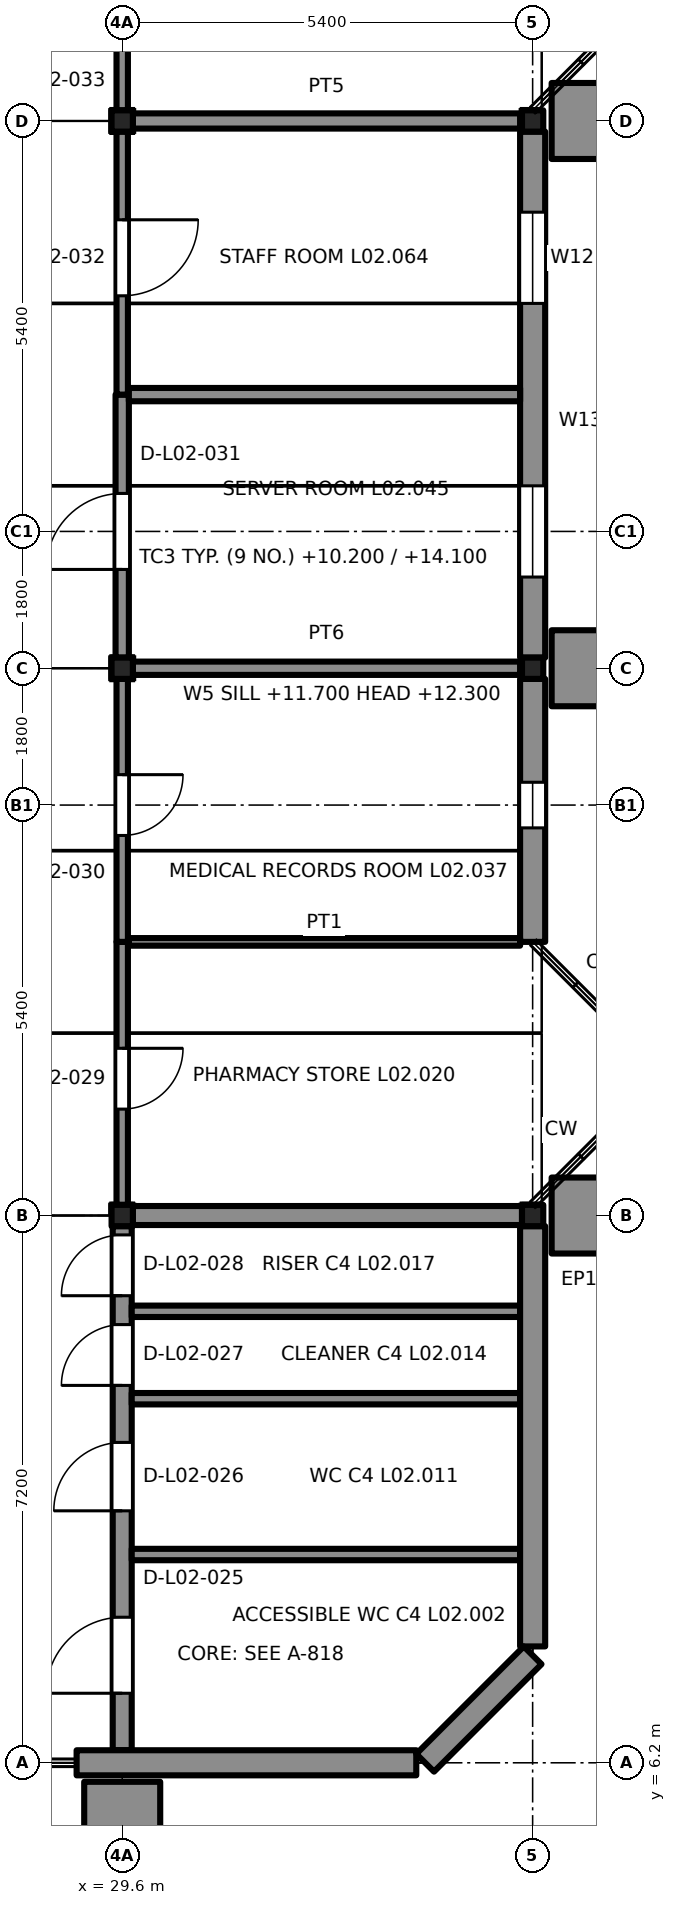
"""IFC4 building model, lengths in metres.
Left out: names, types, materials, properties, quantities, classifications, styles, units other than length and angle.
Written with IfcOpenShell. Run it as: python <this file> out.ifc"""

import sys

from ifc_helpers import new_model, si_unit, direction, frame, frame_2d, origin, origin_2d, place, context, subcontext, project, spatial, rectangle, extrude, element, fill, save


model = new_model("IFC4")
c1 = context("Model", 3, precision=1e-05, world=origin(), true_north=direction((0.0, 1.0)))
c2 = subcontext(c1, "Body", "Model", "MODEL_VIEW")
j1 = project(units=[si_unit("LENGTHUNIT", "METRE"), si_unit("PLANEANGLEUNIT", "RADIAN")], contexts=[c1])
p1 = place(None, origin())
s1 = spatial("IfcSite", under=j1, at=p1, CompositionType="ELEMENT")
p2 = place(p1, origin())
s2 = spatial("IfcBuilding", under=s1, at=p2, CompositionType="ELEMENT")
p3 = place(p2, frame((0.0, 0.0, 10.2)))
s3 = spatial("IfcBuildingStorey", under=s2, at=p3, CompositionType="ELEMENT", Elevation=10.2)
for number, where, z_axis, x_axis in (
    (1, (29.6, 13.4, 0.0), (0.0, 0.0, 1.0), (1.0, 0.0, 0.0)),
    (2, (35.0, 13.4, 0.0), (0.0, 0.0, 1.0), (1.0, 0.0, 0.0)),
    (3, (29.6, 20.6, 0.0), (0.0, 0.0, 1.0), (1.0, 0.0, 0.0)),
    (4, (35.0, 20.6, 0.0), (0.0, 0.0, 1.0), (1.0, 0.0, 0.0)),
    (5, (29.6, 27.8, 0.0), (0.0, 0.0, 1.0), (1.0, 0.0, 0.0)),
    (6, (35.0, 27.8, 0.0), (0.0, 0.0, 1.0), (1.0, 0.0, 0.0)),
):
    element("IfcColumn", number, at=place(p3, frame(where, z_axis=z_axis, x_axis=x_axis)), inside=s3, PredefinedType="COLUMN", context=c2, shape_type="SweptSolid", body=[
        extrude(rectangle(XDim=0.28, YDim=0.28, at=origin_2d()), origin(), (0.0, 0.0, 1.0), 3.9),
    ])
p4 = place(p3, frame((29.6, 6.365, 0.0), z_axis=(0.0, 0.0, 1.0), x_axis=(0.0, 1.0, 0.0)))
e7 = element("IfcWall", 7, at=p4, inside=s3, PredefinedType="SHEAR", context=c2, shape_type="SweptSolid", body=[
    extrude(rectangle(XDim=6.895, YDim=0.25, at=frame_2d((3.448, 0.0))), origin(), (0.0, 0.0, 1.0), 3.65),
])
p5 = place(p4, frame((0.75, 0.0, 0.0)))
e8 = element("IfcOpeningElement", 8, at=p5, cuts=e7, PredefinedType="OPENING", context=c2, shape_type="SweptSolid", body=[
    extrude(rectangle(XDim=1.0, YDim=2.1, at=frame_2d((0.5, 1.05))), frame((0.0, 0.135, 0.0), z_axis=(0.0, -1.0, 0.0), x_axis=(1.0, 0.0, 0.0)), (0.0, 0.0, 1.0), 0.27),
])
p6 = place(p4, frame((3.15, 0.0, 0.0)))
e9 = element("IfcOpeningElement", 9, at=p6, cuts=e7, PredefinedType="OPENING", context=c2, shape_type="SweptSolid", body=[
    extrude(rectangle(XDim=0.9, YDim=2.1, at=frame_2d((0.45, 1.05))), frame((0.0, 0.135, 0.0), z_axis=(0.0, -1.0, 0.0), x_axis=(1.0, 0.0, 0.0)), (0.0, 0.0, 1.0), 0.27),
])
p7 = place(p4, frame((4.8, 0.0, 0.0)))
e10 = element("IfcOpeningElement", 10, at=p7, cuts=e7, PredefinedType="OPENING", context=c2, shape_type="SweptSolid", body=[
    extrude(rectangle(XDim=0.8, YDim=2.1, at=frame_2d((0.4, 1.05))), frame((0.0, 0.135, 0.0), z_axis=(0.0, -1.0, 0.0), x_axis=(1.0, 0.0, 0.0)), (0.0, 0.0, 1.0), 0.27),
])
p8 = place(p4, frame((5.98, 0.0, 0.0)))
e11 = element("IfcOpeningElement", 11, at=p8, cuts=e7, PredefinedType="OPENING", context=c2, shape_type="SweptSolid", body=[
    extrude(rectangle(XDim=0.8, YDim=2.1, at=frame_2d((0.4, 1.05))), frame((0.0, 0.135, 0.0), z_axis=(0.0, -1.0, 0.0), x_axis=(1.0, 0.0, 0.0)), (0.0, 0.0, 1.0), 0.27),
])
p9 = place(p3, frame((29.74, 13.4, 0.0), z_axis=(0.0, 0.0, 1.0), x_axis=(1.0, 0.0, 0.0)))
e12 = element("IfcWall", 12, at=p9, inside=s3, PredefinedType="SHEAR", context=c2, shape_type="SweptSolid", body=[
    extrude(rectangle(XDim=5.12, YDim=0.25, at=frame_2d((2.56, 0.0))), origin(), (0.0, 0.0, 1.0), 3.65),
])
for number, where, z_axis, x_axis in (
    (13, (29.725, 8.94, 0.0), (0.0, 0.0, 1.0), (1.0, 0.0, 0.0)),
    (14, (29.725, 10.99, 0.0), (0.0, 0.0, 1.0), (1.0, 0.0, 0.0)),
    (15, (29.725, 12.14, 0.0), (0.0, 0.0, 1.0), (1.0, 0.0, 0.0)),
):
    element("IfcWall", number, at=place(p3, frame(where, z_axis=z_axis, x_axis=x_axis)), inside=s3, PredefinedType="PARTITIONING", context=c2, shape_type="SweptSolid", body=[
        extrude(rectangle(XDim=5.11, YDim=0.15, at=frame_2d((2.555, 0.0))), origin(), (0.0, 0.0, 1.0), 3.65),
    ])
p10 = place(p3, frame((35.0, 13.26, 0.0), z_axis=(0.0, 0.0, 1.0), x_axis=(0.0, -1.0, 0.0)))
e16 = element("IfcWall", 16, at=p10, inside=s3, PredefinedType="SOLIDWALL", context=c2, shape_type="SweptSolid", body=[
    extrude(rectangle(XDim=5.529, YDim=0.33, at=frame_2d((2.765, 0.0))), origin(), (0.0, 0.0, 1.0), 3.22),
])
p11 = place(p3, frame((35.0, 20.46, 0.0), z_axis=(0.0, 0.0, 1.0), x_axis=(0.0, -1.0, 0.0)))
e17 = element("IfcWall", 17, at=p11, inside=s3, PredefinedType="SOLIDWALL", context=c2, shape_type="SweptSolid", body=[
    extrude(rectangle(XDim=3.46, YDim=0.33, at=frame_2d((1.73, 0.0))), origin(), (0.0, 0.0, 1.0), 3.22),
])
p12 = place(p11, frame((1.36, 0.0, 1.5)))
e18 = element("IfcOpeningElement", 18, at=p12, cuts=e17, PredefinedType="OPENING", context=c2, shape_type="SweptSolid", body=[
    extrude(rectangle(XDim=0.6, YDim=0.6, at=frame_2d((0.3, 0.3))), frame((0.0, 0.175, 0.0), z_axis=(0.0, -1.0, 0.0), x_axis=(1.0, 0.0, 0.0)), (0.0, 0.0, 1.0), 0.35),
])
p13 = place(p3, frame((35.0, 27.66, 0.0), z_axis=(0.0, 0.0, 1.0), x_axis=(0.0, -1.0, 0.0)))
e19 = element("IfcWall", 19, at=p13, inside=s3, PredefinedType="SOLIDWALL", context=c2, shape_type="SweptSolid", body=[
    extrude(rectangle(XDim=6.92, YDim=0.33, at=frame_2d((3.46, 0.0))), origin(), (0.0, 0.0, 1.0), 3.22),
])
p14 = place(p13, frame((4.66, 0.0, 1.2)))
e20 = element("IfcOpeningElement", 20, at=p14, cuts=e19, PredefinedType="OPENING", context=c2, shape_type="SweptSolid", body=[
    extrude(rectangle(XDim=1.2, YDim=1.2, at=frame_2d((0.6, 0.6))), frame((0.0, 0.175, 0.0), z_axis=(0.0, -1.0, 0.0), x_axis=(1.0, 0.0, 0.0)), (0.0, 0.0, 1.0), 0.35),
])
p15 = place(p13, frame((1.06, 0.0, 0.9)))
e21 = element("IfcOpeningElement", 21, at=p15, cuts=e19, PredefinedType="OPENING", context=c2, shape_type="SweptSolid", body=[
    extrude(rectangle(XDim=1.2, YDim=1.5, at=frame_2d((0.6, 0.75))), frame((0.0, 0.175, 0.0), z_axis=(0.0, -1.0, 0.0), x_axis=(1.0, 0.0, 0.0)), (0.0, 0.0, 1.0), 0.35),
])
for number, where, z_axis, x_axis in (
    (22, (35.625, 13.9, 0.0), (0.0, 0.0, 1.0), (0.0, -1.0, 0.0)),
    (23, (35.625, 21.1, 0.0), (0.0, 0.0, 1.0), (0.0, -1.0, 0.0)),
    (24, (35.625, 28.3, 0.0), (0.0, 0.0, 1.0), (0.0, -1.0, 0.0)),
):
    element("IfcWall", number, at=place(p3, frame(where, z_axis=z_axis, x_axis=x_axis)), inside=s3, PredefinedType="SOLIDWALL", context=c2, shape_type="SweptSolid", body=[
        extrude(rectangle(XDim=1.0, YDim=0.75, at=frame_2d((0.5, 0.0))), origin(), (0.0, 0.0, 1.0), 3.9),
    ])
p16 = place(p3, frame((33.469, 6.2, 0.0), z_axis=(0.0, 0.0, 1.0), x_axis=(-1.0, 0.0, 0.0)))
e25 = element("IfcWall", 25, at=p16, inside=s3, PredefinedType="SOLIDWALL", context=c2, shape_type="SweptSolid", body=[
    extrude(rectangle(XDim=4.469, YDim=0.33, at=frame_2d((2.234, 0.0))), origin(), (0.0, 0.0, 1.0), 3.2),
])
p17 = place(p3, frame((30.1, 5.575, 0.0), z_axis=(0.0, 0.0, 1.0), x_axis=(-1.0, 0.0, 0.0)))
e26 = element("IfcWall", 26, at=p17, inside=s3, PredefinedType="SOLIDWALL", context=c2, shape_type="SweptSolid", body=[
    extrude(rectangle(XDim=1.0, YDim=0.75, at=frame_2d((0.5, 0.0))), origin(), (0.0, 0.0, 1.0), 3.9),
])
p18 = place(p3, frame((35.0, 7.614, 0.0), z_axis=(0.0, 0.0, 1.0), x_axis=(-0.707106781187, -0.707106781187, 0.0)))
e27 = element("IfcWall", 27, at=p18, inside=s3, PredefinedType="SOLIDWALL", context=c2, shape_type="SweptSolid", body=[
    extrude(rectangle(XDim=2.0, YDim=0.33, at=frame_2d((1.0, 0.0))), origin(), (0.0, 0.0, 1.0), 3.2),
])
p19 = place(p3, frame((29.6, 17.0, 0.0), z_axis=(0.0, 0.0, 1.0), x_axis=(0.0, -1.0, 0.0)))
e28 = element("IfcWall", 28, at=p19, inside=s3, PredefinedType="PARTITIONING", context=c2, shape_type="SweptSolid", body=[
    extrude(rectangle(XDim=3.46, YDim=0.15, at=frame_2d((1.73, 0.0))), origin(), (0.0, 0.0, 1.0), 3.22),
])
p20 = place(p19, frame((1.4, 0.0, 0.0)))
e29 = element("IfcOpeningElement", 29, at=p20, cuts=e28, PredefinedType="OPENING", context=c2, shape_type="SweptSolid", body=[
    extrude(rectangle(XDim=0.8, YDim=2.1, at=frame_2d((0.4, 1.05))), frame((0.0, 0.085, 0.0), z_axis=(0.0, -1.0, 0.0), x_axis=(1.0, 0.0, 0.0)), (0.0, 0.0, 1.0), 0.17),
])
p21 = place(p3, frame((29.6, 20.46, 0.0), z_axis=(0.0, 0.0, 1.0), x_axis=(0.0, -1.0, 0.0)))
e30 = element("IfcWall", 30, at=p21, inside=s3, PredefinedType="PARTITIONING", context=c2, shape_type="SweptSolid", body=[
    extrude(rectangle(XDim=3.46, YDim=0.15, at=frame_2d((1.73, 0.0))), origin(), (0.0, 0.0, 1.0), 3.22),
])
p22 = place(p21, frame((1.26, 0.0, 0.0)))
e31 = element("IfcOpeningElement", 31, at=p22, cuts=e30, PredefinedType="OPENING", context=c2, shape_type="SweptSolid", body=[
    extrude(rectangle(XDim=0.8, YDim=2.1, at=frame_2d((0.4, 1.05))), frame((0.0, 0.085, 0.0), z_axis=(0.0, -1.0, 0.0), x_axis=(1.0, 0.0, 0.0)), (0.0, 0.0, 1.0), 0.17),
])
p23 = place(p3, frame((34.835, 17.0, 0.0), z_axis=(0.0, 0.0, 1.0), x_axis=(-1.0, 0.0, 0.0)))
e32 = element("IfcWall", 32, at=p23, inside=s3, PredefinedType="PARTITIONING", context=c2, shape_type="SweptSolid", body=[
    extrude(rectangle(XDim=5.147, YDim=0.1, at=frame_2d((2.574, 0.0))), origin(), (0.0, 0.0, 1.0), 3.38),
])
p24 = place(p3, frame((29.6, 20.74, 0.0), z_axis=(0.0, 0.0, 1.0), x_axis=(0.0, 1.0, 0.0)))
e33 = element("IfcWall", 33, at=p24, inside=s3, PredefinedType="PARTITIONING", context=c2, shape_type="SweptSolid", body=[
    extrude(rectangle(XDim=3.46, YDim=0.175, at=frame_2d((1.73, 0.0))), origin(), (0.0, 0.0, 1.0), 3.22),
])
p25 = place(p24, frame((1.16, 0.0, 0.0)))
e34 = element("IfcOpeningElement", 34, at=p25, cuts=e33, PredefinedType="OPENING", context=c2, shape_type="SweptSolid", body=[
    extrude(rectangle(XDim=1.0, YDim=2.1, at=frame_2d((0.5, 1.05))), frame((0.0, 0.097, 0.0), z_axis=(0.0, -1.0, 0.0), x_axis=(1.0, 0.0, 0.0)), (0.0, 0.0, 1.0), 0.195),
])
p26 = place(p3, frame((34.835, 20.6, 0.0), z_axis=(0.0, 0.0, 1.0), x_axis=(-1.0, 0.0, 0.0)))
e35 = element("IfcWall", 35, at=p26, inside=s3, PredefinedType="PARTITIONING", context=c2, shape_type="SweptSolid", body=[
    extrude(rectangle(XDim=5.095, YDim=0.175, at=frame_2d((2.547, 0.0))), origin(), (0.0, 0.0, 1.0), 3.38),
])
p27 = place(p3, frame((29.6, 27.66, 0.0), z_axis=(0.0, 0.0, 1.0), x_axis=(0.0, -1.0, 0.0)))
e36 = element("IfcWall", 36, at=p27, inside=s3, PredefinedType="PARTITIONING", context=c2, shape_type="SweptSolid", body=[
    extrude(rectangle(XDim=3.46, YDim=0.15, at=frame_2d((1.73, 0.0))), origin(), (0.0, 0.0, 1.0), 3.22),
])
p28 = place(p27, frame((1.16, 0.0, 0.0)))
e37 = element("IfcOpeningElement", 37, at=p28, cuts=e36, PredefinedType="OPENING", context=c2, shape_type="SweptSolid", body=[
    extrude(rectangle(XDim=1.0, YDim=2.1, at=frame_2d((0.5, 1.05))), frame((0.0, 0.085, 0.0), z_axis=(0.0, -1.0, 0.0), x_axis=(1.0, 0.0, 0.0)), (0.0, 0.0, 1.0), 0.17),
])
p29 = place(p3, frame((34.835, 24.2, 0.0), z_axis=(0.0, 0.0, 1.0), x_axis=(-1.0, 0.0, 0.0)))
e38 = element("IfcWall", 38, at=p29, inside=s3, PredefinedType="PARTITIONING", context=c2, shape_type="SweptSolid", body=[
    extrude(rectangle(XDim=5.147, YDim=0.175, at=frame_2d((2.574, 0.0))), origin(), (0.0, 0.0, 1.0), 3.38),
])
p30 = place(p3, frame((29.6, 31.4, 0.0), z_axis=(0.0, 0.0, 1.0), x_axis=(0.0, -1.0, 0.0)))
e39 = element("IfcWall", 39, at=p30, inside=s3, PredefinedType="PARTITIONING", context=c2, shape_type="SweptSolid", body=[
    extrude(rectangle(XDim=3.46, YDim=0.15, at=frame_2d((1.73, 0.0))), origin(), (0.0, 0.0, 1.0), 3.22),
])
p31 = place(p30, frame((1.05, 0.0, 0.0)))
e40 = element("IfcOpeningElement", 40, at=p31, cuts=e39, PredefinedType="OPENING", context=c2, shape_type="SweptSolid", body=[
    extrude(rectangle(XDim=1.5, YDim=2.1, at=frame_2d((0.75, 1.05))), frame((0.0, 0.085, 0.0), z_axis=(0.0, -1.0, 0.0), x_axis=(1.0, 0.0, 0.0)), (0.0, 0.0, 1.0), 0.17),
])
p32 = place(p3, frame((34.835, 27.8, 0.0), z_axis=(0.0, 0.0, 1.0), x_axis=(-1.0, 0.0, 0.0)))
e41 = element("IfcWall", 41, at=p32, inside=s3, PredefinedType="PARTITIONING", context=c2, shape_type="SweptSolid", body=[
    extrude(rectangle(XDim=5.095, YDim=0.2, at=frame_2d((2.547, 0.0))), origin(), (0.0, 0.0, 1.0), 3.38),
])
p33 = place(p5, origin())
e42 = element("IfcDoor", 42, at=p33, inside=s3, OperationType="SINGLE_SWING_LEFT", PredefinedType="DOOR", context=c2, shape_type="SweptSolid", body=[
    extrude(rectangle(XDim=1.0, YDim=2.1, at=frame_2d((0.5, 1.05))), frame((0.0, 0.025, 0.0), z_axis=(0.0, -1.0, 0.0), x_axis=(1.0, 0.0, 0.0)), (0.0, 0.0, 1.0), 0.05),
])
fill(e8, e42)
p34 = place(p6, origin())
e43 = element("IfcDoor", 43, at=p34, inside=s3, OperationType="SINGLE_SWING_LEFT", PredefinedType="DOOR", context=c2, shape_type="SweptSolid", body=[
    extrude(rectangle(XDim=0.9, YDim=2.1, at=frame_2d((0.45, 1.05))), frame((0.0, 0.025, 0.0), z_axis=(0.0, -1.0, 0.0), x_axis=(1.0, 0.0, 0.0)), (0.0, 0.0, 1.0), 0.05),
])
fill(e9, e43)
p35 = place(p7, origin())
e44 = element("IfcDoor", 44, at=p35, inside=s3, OperationType="SINGLE_SWING_LEFT", PredefinedType="DOOR", context=c2, shape_type="SweptSolid", body=[
    extrude(rectangle(XDim=0.8, YDim=2.1, at=frame_2d((0.4, 1.05))), frame((0.0, 0.025, 0.0), z_axis=(0.0, -1.0, 0.0), x_axis=(1.0, 0.0, 0.0)), (0.0, 0.0, 1.0), 0.05),
])
fill(e10, e44)
p36 = place(p8, origin())
e45 = element("IfcDoor", 45, at=p36, inside=s3, OperationType="SINGLE_SWING_LEFT", PredefinedType="DOOR", context=c2, shape_type="SweptSolid", body=[
    extrude(rectangle(XDim=0.8, YDim=2.1, at=frame_2d((0.4, 1.05))), frame((0.0, 0.025, 0.0), z_axis=(0.0, -1.0, 0.0), x_axis=(1.0, 0.0, 0.0)), (0.0, 0.0, 1.0), 0.05),
])
fill(e11, e45)
p37 = place(p12, origin())
e46 = element("IfcWindow", 46, at=p37, inside=s3, PartitioningType="SINGLE_PANEL", PredefinedType="WINDOW", context=c2, shape_type="SweptSolid", body=[
    extrude(rectangle(XDim=0.6, YDim=0.6, at=frame_2d((0.3, 0.3))), frame((0.0, -0.03, 0.0), z_axis=(0.0, -1.0, 0.0), x_axis=(1.0, 0.0, 0.0)), (0.0, 0.0, 1.0), 0.06),
])
fill(e18, e46)
p38 = place(p14, origin())
e47 = element("IfcWindow", 47, at=p38, inside=s3, PartitioningType="SINGLE_PANEL", PredefinedType="WINDOW", context=c2, shape_type="SweptSolid", body=[
    extrude(rectangle(XDim=1.2, YDim=1.2, at=frame_2d((0.6, 0.6))), frame((0.0, -0.03, 0.0), z_axis=(0.0, -1.0, 0.0), x_axis=(1.0, 0.0, 0.0)), (0.0, 0.0, 1.0), 0.06),
])
fill(e20, e47)
p39 = place(p15, origin())
e48 = element("IfcWindow", 48, at=p39, inside=s3, PartitioningType="SINGLE_PANEL", PredefinedType="WINDOW", context=c2, shape_type="SweptSolid", body=[
    extrude(rectangle(XDim=1.2, YDim=1.5, at=frame_2d((0.6, 0.75))), frame((0.0, -0.03, 0.0), z_axis=(0.0, -1.0, 0.0), x_axis=(1.0, 0.0, 0.0)), (0.0, 0.0, 1.0), 0.06),
])
fill(e21, e48)
p40 = place(p20, origin())
e49 = element("IfcDoor", 49, at=p40, inside=s3, OperationType="SINGLE_SWING_RIGHT", PredefinedType="DOOR", context=c2, shape_type="SweptSolid", body=[
    extrude(rectangle(XDim=0.8, YDim=2.1, at=frame_2d((0.4, 1.05))), frame((0.0, 0.025, 0.0), z_axis=(0.0, -1.0, 0.0), x_axis=(1.0, 0.0, 0.0)), (0.0, 0.0, 1.0), 0.05),
])
fill(e29, e49)
p41 = place(p22, origin())
e50 = element("IfcDoor", 50, at=p41, inside=s3, OperationType="SINGLE_SWING_LEFT", PredefinedType="DOOR", context=c2, shape_type="SweptSolid", body=[
    extrude(rectangle(XDim=0.8, YDim=2.1, at=frame_2d((0.4, 1.05))), frame((0.0, 0.025, 0.0), z_axis=(0.0, -1.0, 0.0), x_axis=(1.0, 0.0, 0.0)), (0.0, 0.0, 1.0), 0.05),
])
fill(e31, e50)
p42 = place(p25, origin())
e51 = element("IfcDoor", 51, at=p42, inside=s3, OperationType="SINGLE_SWING_LEFT", PredefinedType="DOOR", context=c2, shape_type="SweptSolid", body=[
    extrude(rectangle(XDim=1.0, YDim=2.1, at=frame_2d((0.5, 1.05))), frame((0.0, 0.025, 0.0), z_axis=(0.0, -1.0, 0.0), x_axis=(1.0, 0.0, 0.0)), (0.0, 0.0, 1.0), 0.05),
])
fill(e34, e51)
p43 = place(p28, origin())
e52 = element("IfcDoor", 52, at=p43, inside=s3, OperationType="SINGLE_SWING_LEFT", PredefinedType="DOOR", context=c2, shape_type="SweptSolid", body=[
    extrude(rectangle(XDim=1.0, YDim=2.1, at=frame_2d((0.5, 1.05))), frame((0.0, 0.025, 0.0), z_axis=(0.0, -1.0, 0.0), x_axis=(1.0, 0.0, 0.0)), (0.0, 0.0, 1.0), 0.05),
])
fill(e37, e52)
save(model, sys.argv[1])
